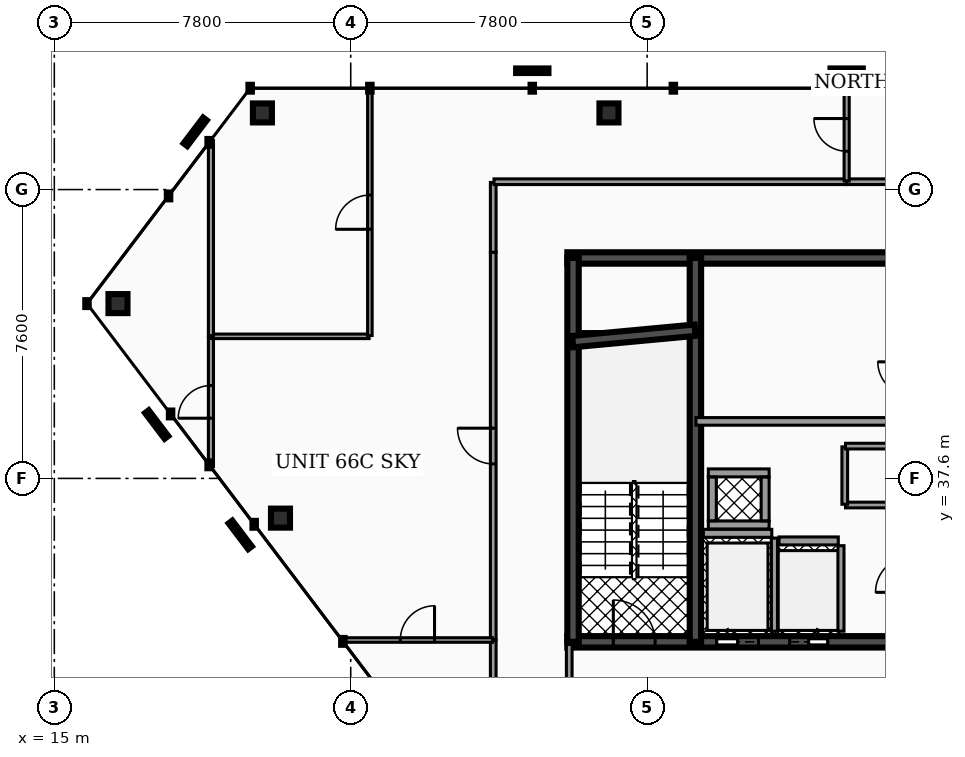
"""IFC4 building model, lengths in metres.
Left out: names, types, materials, properties, quantities, classifications, styles, units other than length and angle.
Written with IfcOpenShell. Run it as: python <this file> out.ifc"""

import sys

from ifc_helpers import new_model, si_unit, direction, frame, frame_2d, origin, origin_2d, place, context, subcontext, project, spatial, rectangle, hollow_rectangle, extrude, element, fill, save


model = new_model("IFC4")
c1 = context("Model", 3, precision=1e-05, world=origin(), true_north=direction((0.0, 1.0)))
c2 = subcontext(c1, "Body", "Model", "MODEL_VIEW")
j1 = project(units=[si_unit("LENGTHUNIT", "METRE"), si_unit("PLANEANGLEUNIT", "RADIAN")], contexts=[c1])
p1 = place(None, origin())
s1 = spatial("IfcSite", under=j1, at=p1, CompositionType="ELEMENT")
p2 = place(p1, origin())
s2 = spatial("IfcBuilding", under=s1, at=p2, CompositionType="ELEMENT")
p3 = place(p2, frame((0.0, 0.0, 261.8)))
s3 = spatial("IfcBuildingStorey", under=s2, at=p3, CompositionType="ELEMENT", Elevation=261.8)
p4 = place(p3, frame((28.5, 43.4, 0.0), z_axis=(0.0, 0.0, 1.0), x_axis=(1.0, 0.0, 0.0)))
e1 = element("IfcWall", 1, at=p4, inside=s3, PredefinedType="SHEAR", context=c2, shape_type="SweptSolid", body=[
    extrude(rectangle(XDim=19.86, YDim=0.3, at=frame_2d((9.93, 0.0))), origin(), (0.0, 0.0, 1.0), 3.18),
])
p5 = place(p3, frame((28.5, 33.3, 0.0), z_axis=(0.0, 0.0, 1.0), x_axis=(1.0, 0.0, 0.0)))
e2 = element("IfcWall", 2, at=p5, inside=s3, PredefinedType="SHEAR", context=c2, shape_type="SweptSolid", body=[
    extrude(rectangle(XDim=19.86, YDim=0.3, at=frame_2d((9.93, 0.0))), origin(), (0.0, 0.0, 1.0), 3.18),
])
p6 = place(p5, frame((3.93, 0.0, 0.0)))
e3 = element("IfcOpeningElement", 3, at=p6, cuts=e2, PredefinedType="OPENING", context=c2, shape_type="SweptSolid", body=[
    extrude(rectangle(XDim=1.1, YDim=2.15, at=frame_2d((0.55, 1.075))), frame((0.0, 0.16, 0.0), z_axis=(0.0, -1.0, 0.0), x_axis=(1.0, 0.0, 0.0)), (0.0, 0.0, 1.0), 0.32),
])
p7 = place(p5, frame((14.77, 0.0, 0.0)))
e4 = element("IfcOpeningElement", 4, at=p7, cuts=e2, PredefinedType="OPENING", context=c2, shape_type="SweptSolid", body=[
    extrude(rectangle(XDim=1.1, YDim=2.15, at=frame_2d((0.55, 1.075))), frame((0.0, 0.16, 0.0), z_axis=(0.0, -1.0, 0.0), x_axis=(1.0, 0.0, 0.0)), (0.0, 0.0, 1.0), 0.32),
])
p8 = place(p5, frame((11.25, 0.0, 0.0)))
e5 = element("IfcOpeningElement", 5, at=p8, cuts=e2, PredefinedType="OPENING", context=c2, shape_type="SweptSolid", body=[
    extrude(rectangle(XDim=1.0, YDim=2.1, at=frame_2d((0.5, 1.05))), frame((0.0, 0.16, 0.0), z_axis=(0.0, -1.0, 0.0), x_axis=(1.0, 0.0, 0.0)), (0.0, 0.0, 1.0), 0.32),
])
p9 = place(p5, frame((12.95, 0.0, 0.0)))
e6 = element("IfcOpeningElement", 6, at=p9, cuts=e2, PredefinedType="OPENING", context=c2, shape_type="SweptSolid", body=[
    extrude(rectangle(XDim=1.0, YDim=2.1, at=frame_2d((0.5, 1.05))), frame((0.0, 0.16, 0.0), z_axis=(0.0, -1.0, 0.0), x_axis=(1.0, 0.0, 0.0)), (0.0, 0.0, 1.0), 0.32),
])
p10 = place(p5, frame((5.85, 0.0, 0.0)))
e7 = element("IfcOpeningElement", 7, at=p10, cuts=e2, PredefinedType="OPENING", context=c2, shape_type="SweptSolid", body=[
    extrude(rectangle(XDim=1.0, YDim=2.1, at=frame_2d((0.5, 1.05))), frame((0.0, 0.16, 0.0), z_axis=(0.0, -1.0, 0.0), x_axis=(1.0, 0.0, 0.0)), (0.0, 0.0, 1.0), 0.32),
])
p11 = place(p5, frame((1.21, 0.0, 0.0)))
e8 = element("IfcOpeningElement", 8, at=p11, cuts=e2, PredefinedType="OPENING", context=c2, shape_type="SweptSolid", body=[
    extrude(rectangle(XDim=1.1, YDim=2.2, at=frame_2d((0.55, 1.1))), frame((0.0, 0.16, 0.0), z_axis=(0.0, -1.0, 0.0), x_axis=(1.0, 0.0, 0.0)), (0.0, 0.0, 1.0), 0.32),
])
p12 = place(p5, frame((9.34, 0.0, 0.0)))
e9 = element("IfcOpeningElement", 9, at=p12, cuts=e2, PredefinedType="OPENING", context=c2, shape_type="SweptSolid", body=[
    extrude(rectangle(XDim=1.12, YDim=2.05, at=frame_2d((0.56, 1.025))), frame((0.0, 0.16, 0.0), z_axis=(0.0, -1.0, 0.0), x_axis=(1.0, 0.0, 0.0)), (0.0, 0.0, 1.0), 0.32),
])
p13 = place(p5, frame((17.55, 0.0, 0.0)))
e10 = element("IfcOpeningElement", 10, at=p13, cuts=e2, PredefinedType="OPENING", context=c2, shape_type="SweptSolid", body=[
    extrude(rectangle(XDim=1.1, YDim=2.2, at=frame_2d((0.55, 1.1))), frame((0.0, 0.16, 0.0), z_axis=(0.0, -1.0, 0.0), x_axis=(1.0, 0.0, 0.0)), (0.0, 0.0, 1.0), 0.32),
])
for number, where, z_axis, x_axis in (
    (11, (28.65, 33.3, 0.0), (0.0, 0.0, 1.0), (0.0, 1.0, 0.0)),
    (12, (31.87, 33.3, 0.0), (0.0, 0.0, 1.0), (0.0, 1.0, 0.0)),
):
    element("IfcWall", number, at=place(p3, frame(where, z_axis=z_axis, x_axis=x_axis)), inside=s3, PredefinedType="SHEAR", context=c2, shape_type="SweptSolid", body=[
        extrude(rectangle(XDim=10.1, YDim=0.3, at=frame_2d((5.05, 0.0))), origin(), (0.0, 0.0, 1.0), 3.18),
    ])
p14 = place(p3, frame((28.64, 41.2, 0.0), z_axis=(0.0, 0.0, 1.0), x_axis=(0.995687118776, 0.092774789157, 0.0)))
e13 = element("IfcWall", 13, at=p14, inside=s3, PredefinedType="SHEAR", context=c2, shape_type="SweptSolid", body=[
    extrude(rectangle(XDim=3.234, YDim=0.3, at=frame_2d((1.617, 0.0))), origin(), (0.0, 0.0, 1.0), 3.18),
])
for number, where, z_axis, x_axis in (
    (14, (29.595, 47.217, 0.0), (0.0, 0.0, 1.0), (1.0, 0.0, 0.0)),
    (15, (20.476, 47.217, 0.0), (0.0, 0.0, 1.0), (1.0, 0.0, 0.0)),
    (16, (16.676, 42.199, 0.0), (0.0, 0.0, 1.0), (1.0, 0.0, 0.0)),
    (17, (20.952, 36.555, 0.0), (0.0, 0.0, 1.0), (1.0, 0.0, 0.0)),
):
    element("IfcColumn", number, at=place(p3, frame(where, z_axis=z_axis, x_axis=x_axis)), inside=s3, PredefinedType="COLUMN", context=c2, shape_type="SweptSolid", body=[
        extrude(hollow_rectangle(XDim=0.5, YDim=0.5, WallThickness=0.025, at=origin_2d()), origin(), (0.0, 0.0, 1.0), 3.18),
    ])
p15 = place(p3, frame((32.08, 36.155, 0.0), z_axis=(0.0, 0.0, 1.0), x_axis=(1.0, 0.0, 0.0)))
e18 = element("IfcWall", 18, at=p15, inside=s3, PredefinedType="SOLIDWALL", context=c2, shape_type="SweptSolid", body=[
    extrude(rectangle(XDim=1.8, YDim=0.21, at=frame_2d((0.9, 0.0))), origin(), (0.0, 0.0, 1.0), 3.18),
])
p16 = place(p3, frame((33.95, 33.58, 0.0), z_axis=(0.0, 0.0, 1.0), x_axis=(0.0, 1.0, 0.0)))
e19 = element("IfcWall", 19, at=p16, inside=s3, PredefinedType="SOLIDWALL", context=c2, shape_type="SweptSolid", body=[
    extrude(rectangle(XDim=2.45, YDim=0.16, at=frame_2d((1.225, 0.0))), origin(), (0.0, 0.0, 1.0), 3.18),
])
p17 = place(p3, frame((34.07, 35.955, 0.0), z_axis=(0.0, 0.0, 1.0), x_axis=(1.0, 0.0, 0.0)))
e20 = element("IfcWall", 20, at=p17, inside=s3, PredefinedType="SOLIDWALL", context=c2, shape_type="SweptSolid", body=[
    extrude(rectangle(XDim=1.56, YDim=0.21, at=frame_2d((0.78, 0.0))), origin(), (0.0, 0.0, 1.0), 3.18),
])
p18 = place(p3, frame((35.7, 33.58, 0.0), z_axis=(0.0, 0.0, 1.0), x_axis=(0.0, 1.0, 0.0)))
e21 = element("IfcWall", 21, at=p18, inside=s3, PredefinedType="SOLIDWALL", context=c2, shape_type="SweptSolid", body=[
    extrude(rectangle(XDim=2.25, YDim=0.16, at=frame_2d((1.125, 0.0))), origin(), (0.0, 0.0, 1.0), 3.18),
])
for number, where, z_axis, x_axis in (
    (22, (32.21, 36.375, 0.0), (0.0, 0.0, 1.0), (1.0, 0.0, 0.0)),
    (23, (32.21, 37.745, 0.0), (0.0, 0.0, 1.0), (1.0, 0.0, 0.0)),
):
    element("IfcWall", number, at=place(p3, frame(where, z_axis=z_axis, x_axis=x_axis)), inside=s3, PredefinedType="SOLIDWALL", context=c2, shape_type="SweptSolid", body=[
        extrude(rectangle(XDim=1.6, YDim=0.21, at=frame_2d((0.8, 0.0))), origin(), (0.0, 0.0, 1.0), 3.18),
    ])
for number, where, z_axis, x_axis in (
    (24, (32.315, 36.485, 0.0), (0.0, 0.0, 1.0), (0.0, 1.0, 0.0)),
    (25, (33.705, 36.485, 0.0), (0.0, 0.0, 1.0), (0.0, 1.0, 0.0)),
):
    element("IfcWall", number, at=place(p3, frame(where, z_axis=z_axis, x_axis=x_axis)), inside=s3, PredefinedType="SOLIDWALL", context=c2, shape_type="SweptSolid", body=[
        extrude(rectangle(XDim=1.15, YDim=0.21, at=frame_2d((0.575, 0.0))), origin(), (0.0, 0.0, 1.0), 3.18),
    ])
p19 = place(p3, frame((35.82, 36.9, 0.0), z_axis=(0.0, 0.0, 1.0), x_axis=(1.0, 0.0, 0.0)))
e26 = element("IfcWall", 26, at=p19, inside=s3, PredefinedType="PARTITIONING", context=c2, shape_type="SweptSolid", body=[
    extrude(rectangle(XDim=1.71, YDim=0.15, at=frame_2d((0.855, 0.0))), origin(), (0.0, 0.0, 1.0), 2.235),
])
p20 = place(p3, frame((35.8, 36.92, 0.0), z_axis=(0.0, 0.0, 1.0), x_axis=(0.0, 1.0, 0.0)))
e27 = element("IfcWall", 27, at=p20, inside=s3, PredefinedType="PARTITIONING", context=c2, shape_type="SweptSolid", body=[
    extrude(rectangle(XDim=1.51, YDim=0.15, at=frame_2d((0.755, 0.0))), origin(), (0.0, 0.0, 1.0), 2.235),
])
p21 = place(p3, frame((35.82, 38.45, 0.0), z_axis=(0.0, 0.0, 1.0), x_axis=(1.0, 0.0, 0.0)))
e28 = element("IfcWall", 28, at=p21, inside=s3, PredefinedType="PARTITIONING", context=c2, shape_type="SweptSolid", body=[
    extrude(rectangle(XDim=1.71, YDim=0.15, at=frame_2d((0.855, 0.0))), origin(), (0.0, 0.0, 1.0), 2.235),
])
p22 = place(p3, frame((31.885, 39.1, 0.0), z_axis=(0.0, 0.0, 1.0), x_axis=(1.0, 0.0, 0.0)))
e29 = element("IfcWall", 29, at=p22, inside=s3, PredefinedType="PARTITIONING", context=c2, shape_type="SweptSolid", body=[
    extrude(rectangle(XDim=5.645, YDim=0.2, at=frame_2d((2.823, 0.0))), origin(), (0.0, 0.0, 1.0), 2.235),
])
p23 = place(p3, frame((28.55, 30.17, 0.0), z_axis=(0.0, 0.0, 1.0), x_axis=(0.0, 1.0, 0.0)))
e30 = element("IfcWall", 30, at=p23, inside=s3, PredefinedType="PARTITIONING", context=c2, shape_type="SweptSolid", body=[
    extrude(rectangle(XDim=3.06, YDim=0.15, at=frame_2d((1.53, 0.0))), origin(), (0.0, 0.0, 1.0), 2.235),
])
p24 = place(p23, frame((1.06, 0.0, 0.0)))
e31 = element("IfcOpeningElement", 31, at=p24, cuts=e30, PredefinedType="OPENING", context=c2, shape_type="SweptSolid", body=[
    extrude(rectangle(XDim=0.94, YDim=2.05, at=frame_2d((0.47, 1.025))), frame((0.0, 0.085, 0.0), z_axis=(0.0, -1.0, 0.0), x_axis=(1.0, 0.0, 0.0)), (0.0, 0.0, 1.0), 0.17),
])
p25 = place(p3, frame((26.55, 33.353, 0.0), z_axis=(0.0, 0.0, 1.0), x_axis=(0.0, 1.0, 0.0)))
e32 = element("IfcWall", 32, at=p25, inside=s3, PredefinedType="PARTITIONING", context=c2, shape_type="SweptSolid", body=[
    extrude(rectangle(XDim=10.197, YDim=0.15, at=frame_2d((5.099, 0.0))), origin(), (0.0, 0.0, 1.0), 2.235),
])
p26 = place(p25, frame((4.628, 0.0, 0.0)))
e33 = element("IfcOpeningElement", 33, at=p26, cuts=e32, PredefinedType="OPENING", context=c2, shape_type="SweptSolid", body=[
    extrude(rectangle(XDim=0.94, YDim=2.05, at=frame_2d((0.47, 1.025))), frame((0.0, 0.085, 0.0), z_axis=(0.0, -1.0, 0.0), x_axis=(1.0, 0.0, 0.0)), (0.0, 0.0, 1.0), 0.17),
])
p27 = place(p3, frame((26.55, 43.55, 0.0), z_axis=(0.0, 0.0, 1.0), x_axis=(0.0, 1.0, 0.0)))
e34 = element("IfcWall", 34, at=p27, inside=s3, PredefinedType="PARTITIONING", context=c2, shape_type="SweptSolid", body=[
    extrude(rectangle(XDim=1.837, YDim=0.15, at=frame_2d((0.918, 0.0))), origin(), (0.0, 0.0, 1.0), 2.235),
])
p28 = place(p3, frame((26.57, 45.407, 0.0), z_axis=(0.0, 0.0, 1.0), x_axis=(1.0, 0.0, 0.0)))
e35 = element("IfcWall", 35, at=p28, inside=s3, PredefinedType="PARTITIONING", context=c2, shape_type="SweptSolid", body=[
    extrude(rectangle(XDim=9.275, YDim=0.15, at=frame_2d((4.637, 0.0))), origin(), (0.0, 0.0, 1.0), 2.235),
])
p29 = place(p3, frame((35.855, 45.407, 0.0), z_axis=(0.0, 0.0, 1.0), x_axis=(1.0, 0.0, 0.0)))
e36 = element("IfcWall", 36, at=p29, inside=s3, PredefinedType="PARTITIONING", context=c2, shape_type="SweptSolid", body=[
    extrude(rectangle(XDim=2.54, YDim=0.15, at=frame_2d((1.27, 0.0))), origin(), (0.0, 0.0, 1.0), 2.235),
])
p30 = place(p3, frame((26.55, 32.183, 0.0), z_axis=(0.0, 0.0, 1.0), x_axis=(0.0, 1.0, 0.0)))
e37 = element("IfcWall", 37, at=p30, inside=s3, PredefinedType="PARTITIONING", context=c2, shape_type="SweptSolid", body=[
    extrude(rectangle(XDim=1.16, YDim=0.15, at=frame_2d((0.58, 0.0))), origin(), (0.0, 0.0, 1.0), 2.235),
])
p31 = place(p3, frame((19.122, 37.909, 0.0), z_axis=(0.0, 0.0, 1.0), x_axis=(0.0, 1.0, 0.0)))
e38 = element("IfcWall", 38, at=p31, inside=s3, PredefinedType="PARTITIONING", context=c2, shape_type="SweptSolid", body=[
    extrude(rectangle(XDim=3.409, YDim=0.135, at=frame_2d((1.705, 0.0))), origin(), (0.0, 0.0, 1.0), 2.235),
])
p32 = place(p31, frame((1.275, 0.0, 0.0)))
e39 = element("IfcOpeningElement", 39, at=p32, cuts=e38, PredefinedType="OPENING", context=c2, shape_type="SweptSolid", body=[
    extrude(rectangle(XDim=0.86, YDim=2.05, at=frame_2d((0.43, 1.025))), frame((0.0, 0.077, 0.0), z_axis=(0.0, -1.0, 0.0), x_axis=(1.0, 0.0, 0.0)), (0.0, 0.0, 1.0), 0.155),
])
p33 = place(p3, frame((35.85, 45.427, 0.0), z_axis=(0.0, 0.0, 1.0), x_axis=(0.0, 1.0, 0.0)))
e40 = element("IfcWall", 40, at=p33, inside=s3, PredefinedType="PARTITIONING", context=c2, shape_type="SweptSolid", body=[
    extrude(rectangle(XDim=2.425, YDim=0.135, at=frame_2d((1.212, 0.0))), origin(), (0.0, 0.0, 1.0), 2.235),
])
p34 = place(p33, frame((0.782, 0.0, 0.0)))
e41 = element("IfcOpeningElement", 41, at=p34, cuts=e40, PredefinedType="OPENING", context=c2, shape_type="SweptSolid", body=[
    extrude(rectangle(XDim=0.86, YDim=2.05, at=frame_2d((0.43, 1.025))), frame((0.0, 0.077, 0.0), z_axis=(0.0, -1.0, 0.0), x_axis=(1.0, 0.0, 0.0)), (0.0, 0.0, 1.0), 0.155),
])
p35 = place(p3, frame((19.142, 41.338, 0.0), z_axis=(0.0, 0.0, 1.0), x_axis=(1.0, 0.0, 0.0)))
e42 = element("IfcWall", 42, at=p35, inside=s3, PredefinedType="PARTITIONING", context=c2, shape_type="SweptSolid", body=[
    extrude(rectangle(XDim=4.142, YDim=0.12, at=frame_2d((2.071, 0.0))), origin(), (0.0, 0.0, 1.0), 2.235),
])
p36 = place(p3, frame((23.304, 41.358, 0.0), z_axis=(0.0, 0.0, 1.0), x_axis=(0.0, 1.0, 0.0)))
e43 = element("IfcWall", 43, at=p36, inside=s3, PredefinedType="PARTITIONING", context=c2, shape_type="SweptSolid", body=[
    extrude(rectangle(XDim=6.493, YDim=0.12, at=frame_2d((3.247, 0.0))), origin(), (0.0, 0.0, 1.0), 2.235),
])
p37 = place(p36, frame((2.797, 0.0, 0.0)))
e44 = element("IfcOpeningElement", 44, at=p37, cuts=e43, PredefinedType="OPENING", context=c2, shape_type="SweptSolid", body=[
    extrude(rectangle(XDim=0.9, YDim=2.05, at=frame_2d((0.45, 1.025))), frame((0.0, 0.07, 0.0), z_axis=(0.0, -1.0, 0.0), x_axis=(1.0, 0.0, 0.0)), (0.0, 0.0, 1.0), 0.14),
])
p38 = place(p3, frame((22.581, 33.348, 0.0), z_axis=(0.0, 0.0, 1.0), x_axis=(1.0, 0.0, 0.0)))
e45 = element("IfcWall", 45, at=p38, inside=s3, PredefinedType="PARTITIONING", context=c2, shape_type="SweptSolid", body=[
    extrude(rectangle(XDim=3.949, YDim=0.12, at=frame_2d((1.975, 0.0))), origin(), (0.0, 0.0, 1.0), 2.235),
])
p39 = place(p38, frame((1.525, 0.0, 0.0)))
e46 = element("IfcOpeningElement", 46, at=p39, cuts=e45, PredefinedType="OPENING", context=c2, shape_type="SweptSolid", body=[
    extrude(rectangle(XDim=0.9, YDim=2.05, at=frame_2d((0.45, 1.025))), frame((0.0, 0.07, 0.0), z_axis=(0.0, -1.0, 0.0), x_axis=(1.0, 0.0, 0.0)), (0.0, 0.0, 1.0), 0.14),
])
p40 = place(p3, frame((19.122, 41.358, 0.0), z_axis=(0.0, 0.0, 1.0), x_axis=(0.0, 1.0, 0.0)))
e47 = element("IfcWall", 47, at=p40, inside=s3, PredefinedType="PARTITIONING", context=c2, shape_type="SweptSolid", body=[
    extrude(rectangle(XDim=5.131, YDim=0.135, at=frame_2d((2.566, 0.0))), origin(), (0.0, 0.0, 1.0), 2.235),
])
p41 = place(p6, origin())
e48 = element("IfcDoor", 48, at=p41, inside=s3, OperationType="SLIDING_TO_LEFT", PredefinedType="DOOR", context=c2, shape_type="SweptSolid", body=[
    extrude(rectangle(XDim=1.1, YDim=2.15, at=frame_2d((0.55, 1.075))), frame((0.0, 0.025, 0.0), z_axis=(0.0, -1.0, 0.0), x_axis=(1.0, 0.0, 0.0)), (0.0, 0.0, 1.0), 0.05),
])
fill(e3, e48)
p42 = place(p10, origin())
e49 = element("IfcDoor", 49, at=p42, inside=s3, OperationType="SLIDING_TO_RIGHT", PredefinedType="DOOR", context=c2, shape_type="SweptSolid", body=[
    extrude(rectangle(XDim=1.0, YDim=2.1, at=frame_2d((0.5, 1.05))), frame((0.0, 0.025, 0.0), z_axis=(0.0, -1.0, 0.0), x_axis=(1.0, 0.0, 0.0)), (0.0, 0.0, 1.0), 0.05),
])
fill(e7, e49)
p43 = place(p11, origin())
e50 = element("IfcDoor", 50, at=p43, inside=s3, OperationType="SINGLE_SWING_LEFT", PredefinedType="DOOR", context=c2, shape_type="SweptSolid", body=[
    extrude(rectangle(XDim=1.1, YDim=2.2, at=frame_2d((0.55, 1.1))), frame((0.0, 0.025, 0.0), z_axis=(0.0, -1.0, 0.0), x_axis=(1.0, 0.0, 0.0)), (0.0, 0.0, 1.0), 0.05),
])
fill(e8, e50)
p44 = place(p26, origin())
e51 = element("IfcDoor", 51, at=p44, inside=s3, OperationType="SINGLE_SWING_RIGHT", PredefinedType="DOOR", context=c2, shape_type="SweptSolid", body=[
    extrude(rectangle(XDim=0.94, YDim=2.05, at=frame_2d((0.47, 1.025))), frame((0.0, 0.025, 0.0), z_axis=(0.0, -1.0, 0.0), x_axis=(1.0, 0.0, 0.0)), (0.0, 0.0, 1.0), 0.05),
])
fill(e33, e51)
p45 = place(p32, origin())
e52 = element("IfcDoor", 52, at=p45, inside=s3, OperationType="SINGLE_SWING_LEFT", PredefinedType="DOOR", context=c2, shape_type="SweptSolid", body=[
    extrude(rectangle(XDim=0.86, YDim=2.05, at=frame_2d((0.43, 1.025))), frame((0.0, 0.025, 0.0), z_axis=(0.0, -1.0, 0.0), x_axis=(1.0, 0.0, 0.0)), (0.0, 0.0, 1.0), 0.05),
])
fill(e39, e52)
p46 = place(p34, origin())
e53 = element("IfcDoor", 53, at=p46, inside=s3, OperationType="SINGLE_SWING_RIGHT", PredefinedType="DOOR", context=c2, shape_type="SweptSolid", body=[
    extrude(rectangle(XDim=0.86, YDim=2.05, at=frame_2d((0.43, 1.025))), frame((0.0, 0.025, 0.0), z_axis=(0.0, -1.0, 0.0), x_axis=(1.0, 0.0, 0.0)), (0.0, 0.0, 1.0), 0.05),
])
fill(e41, e53)
p47 = place(p37, origin())
e54 = element("IfcDoor", 54, at=p47, inside=s3, OperationType="SINGLE_SWING_LEFT", PredefinedType="DOOR", context=c2, shape_type="SweptSolid", body=[
    extrude(rectangle(XDim=0.9, YDim=2.05, at=frame_2d((0.45, 1.025))), frame((0.0, 0.025, 0.0), z_axis=(0.0, -1.0, 0.0), x_axis=(1.0, 0.0, 0.0)), (0.0, 0.0, 1.0), 0.05),
])
fill(e44, e54)
p48 = place(p39, origin())
e55 = element("IfcDoor", 55, at=p48, inside=s3, OperationType="SINGLE_SWING_RIGHT", PredefinedType="DOOR", context=c2, shape_type="SweptSolid", body=[
    extrude(rectangle(XDim=0.9, YDim=2.05, at=frame_2d((0.45, 1.025))), frame((0.0, 0.025, 0.0), z_axis=(0.0, -1.0, 0.0), x_axis=(1.0, 0.0, 0.0)), (0.0, 0.0, 1.0), 0.05),
])
fill(e46, e55)
save(model, sys.argv[1])
